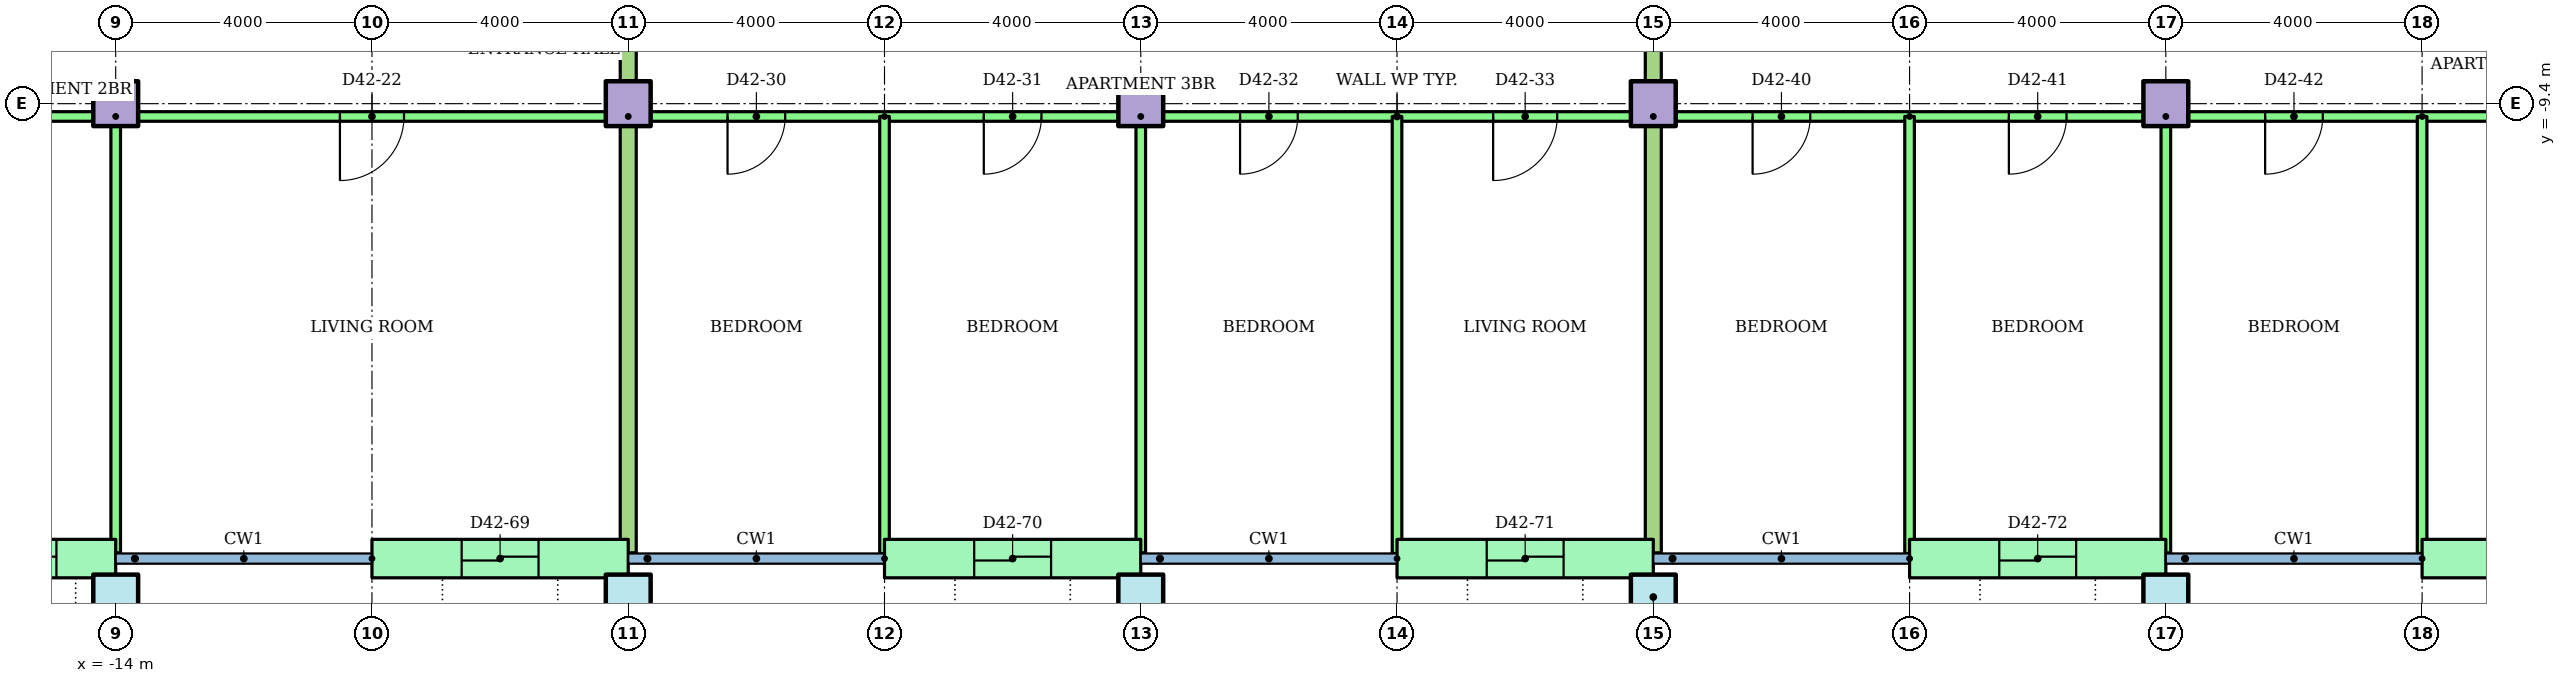
"""IFC4 building model, lengths in metres.
Left out: names, types, materials, properties, quantities, classifications, styles, units other than length and angle.
Written with IfcOpenShell. Run it as: python <this file> out.ifc"""

import sys

from ifc_helpers import new_model, si_unit, direction, frame, frame_2d, origin, origin_2d, place, context, subcontext, project, spatial, rectangle, hollow_rectangle, extrude, element, fill, save


model = new_model("IFC4")
c1 = context("Model", 3, precision=1e-05, world=origin(), true_north=direction((0.0, 1.0)))
c2 = subcontext(c1, "Body", "Model", "MODEL_VIEW")
j1 = project(units=[si_unit("LENGTHUNIT", "METRE"), si_unit("PLANEANGLEUNIT", "RADIAN")], contexts=[c1])
p1 = place(None, origin())
s1 = spatial("IfcSite", under=j1, at=p1, CompositionType="ELEMENT")
p2 = place(p1, origin())
s2 = spatial("IfcBuilding", under=s1, at=p2, CompositionType="ELEMENT")
p3 = place(p2, frame((0.0, 0.0, 165.3)))
s3 = spatial("IfcBuildingStorey", under=s2, at=p3, CompositionType="ELEMENT", Elevation=165.3)
for number, where in (
    (1, (-14.0, -17.1, 0.0)),
    (2, (-6.0, -17.1, 0.0)),
    (3, (2.0, -17.1, 0.0)),
    (4, (10.0, -17.1, 0.0)),
    (5, (18.0, -17.1, 0.0)),
):
    element("IfcColumn", number, at=place(p3, frame(where)), inside=s3, PredefinedType="COLUMN", context=c2, shape_type="SweptSolid", body=[
        extrude(hollow_rectangle(XDim=0.7, YDim=0.7, WallThickness=0.036, at=origin_2d()), origin(), (0.0, 0.0, 1.0), 3.2),
    ])
for number, where in (
    (6, (-14.0, -9.4, 0.0)),
    (7, (-6.0, -9.4, 0.0)),
    (8, (2.0, -9.4, 0.0)),
    (9, (10.0, -9.4, 0.0)),
    (10, (18.0, -9.4, 0.0)),
):
    element("IfcColumn", number, at=place(p3, frame(where)), inside=s3, PredefinedType="COLUMN", context=c2, shape_type="SweptSolid", body=[
        extrude(rectangle(XDim=0.7, YDim=0.7, at=origin_2d()), origin(), (0.0, 0.0, 1.0), 3.2),
    ])
p4 = place(p3, frame((-17.05, -16.5, 0.0)))
e11 = element("IfcWall", 11, at=p4, inside=s3, PredefinedType="STANDARD", context=c2, shape_type="SweptSolid", body=[
    extrude(rectangle(XDim=3.05, YDim=0.6, at=frame_2d((1.525, 0.0))), origin(), (0.0, 0.0, 1.0), 2.92),
])
p5 = place(p4, frame((0.925, 0.0, 0.0)))
e12 = element("IfcOpeningElement", 12, at=p5, cuts=e11, PredefinedType="OPENING", context=c2, shape_type="SweptSolid", body=[
    extrude(rectangle(XDim=1.2, YDim=2.1, at=frame_2d((0.6, 1.05))), frame((0.0, 0.31, 0.0), z_axis=(0.0, -1.0, 0.0), x_axis=(1.0, 0.0, 0.0)), (0.0, 0.0, 1.0), 0.62),
])
p6 = place(p3, frame((-10.0, -16.5, 0.0)))
e13 = element("IfcWall", 13, at=p6, inside=s3, PredefinedType="STANDARD", context=c2, shape_type="SweptSolid", body=[
    extrude(rectangle(XDim=4.0, YDim=0.6, at=frame_2d((2.0, 0.0))), origin(), (0.0, 0.0, 1.0), 2.92),
])
p7 = place(p6, frame((1.4, 0.0, 0.0)))
e14 = element("IfcOpeningElement", 14, at=p7, cuts=e13, PredefinedType="OPENING", context=c2, shape_type="SweptSolid", body=[
    extrude(rectangle(XDim=1.2, YDim=2.1, at=frame_2d((0.6, 1.05))), frame((0.0, 0.31, 0.0), z_axis=(0.0, -1.0, 0.0), x_axis=(1.0, 0.0, 0.0)), (0.0, 0.0, 1.0), 0.62),
])
p8 = place(p3, frame((-2.0, -16.5, 0.0)))
e15 = element("IfcWall", 15, at=p8, inside=s3, PredefinedType="STANDARD", context=c2, shape_type="SweptSolid", body=[
    extrude(rectangle(XDim=4.0, YDim=0.6, at=frame_2d((2.0, 0.0))), origin(), (0.0, 0.0, 1.0), 2.92),
])
p9 = place(p8, frame((1.4, 0.0, 0.0)))
e16 = element("IfcOpeningElement", 16, at=p9, cuts=e15, PredefinedType="OPENING", context=c2, shape_type="SweptSolid", body=[
    extrude(rectangle(XDim=1.2, YDim=2.1, at=frame_2d((0.6, 1.05))), frame((0.0, 0.31, 0.0), z_axis=(0.0, -1.0, 0.0), x_axis=(1.0, 0.0, 0.0)), (0.0, 0.0, 1.0), 0.62),
])
p10 = place(p3, frame((6.0, -16.5, 0.0)))
e17 = element("IfcWall", 17, at=p10, inside=s3, PredefinedType="STANDARD", context=c2, shape_type="SweptSolid", body=[
    extrude(rectangle(XDim=4.0, YDim=0.6, at=frame_2d((2.0, 0.0))), origin(), (0.0, 0.0, 1.0), 2.92),
])
p11 = place(p10, frame((1.4, 0.0, 0.0)))
e18 = element("IfcOpeningElement", 18, at=p11, cuts=e17, PredefinedType="OPENING", context=c2, shape_type="SweptSolid", body=[
    extrude(rectangle(XDim=1.2, YDim=2.1, at=frame_2d((0.6, 1.05))), frame((0.0, 0.31, 0.0), z_axis=(0.0, -1.0, 0.0), x_axis=(1.0, 0.0, 0.0)), (0.0, 0.0, 1.0), 0.62),
])
p12 = place(p3, frame((14.0, -16.5, 0.0)))
e19 = element("IfcWall", 19, at=p12, inside=s3, PredefinedType="STANDARD", context=c2, shape_type="SweptSolid", body=[
    extrude(rectangle(XDim=4.0, YDim=0.6, at=frame_2d((2.0, 0.0))), origin(), (0.0, 0.0, 1.0), 2.92),
])
p13 = place(p12, frame((1.4, 0.0, 0.0)))
e20 = element("IfcOpeningElement", 20, at=p13, cuts=e19, PredefinedType="OPENING", context=c2, shape_type="SweptSolid", body=[
    extrude(rectangle(XDim=1.2, YDim=2.1, at=frame_2d((0.6, 1.05))), frame((0.0, 0.31, 0.0), z_axis=(0.0, -1.0, 0.0), x_axis=(1.0, 0.0, 0.0)), (0.0, 0.0, 1.0), 0.62),
])
p14 = place(p3, frame((22.0, -16.5, 0.0)))
e21 = element("IfcWall", 21, at=p14, inside=s3, PredefinedType="STANDARD", context=c2, shape_type="SweptSolid", body=[
    extrude(rectangle(XDim=4.0, YDim=0.6, at=frame_2d((2.0, 0.0))), origin(), (0.0, 0.0, 1.0), 2.92),
])
p15 = place(p14, frame((1.4, 0.0, 0.0)))
e22 = element("IfcOpeningElement", 22, at=p15, cuts=e21, PredefinedType="OPENING", context=c2, shape_type="SweptSolid", body=[
    extrude(rectangle(XDim=1.2, YDim=2.1, at=frame_2d((0.6, 1.05))), frame((0.0, 0.31, 0.0), z_axis=(0.0, -1.0, 0.0), x_axis=(1.0, 0.0, 0.0)), (0.0, 0.0, 1.0), 0.62),
])
p16 = place(p3, frame((-6.0, -9.6, 0.0), z_axis=(0.0, 0.0, 1.0), x_axis=(-1.0, 0.0, 0.0)))
e23 = element("IfcWall", 23, at=p16, inside=s3, PredefinedType="PARTITIONING", context=c2, shape_type="SweptSolid", body=[
    extrude(rectangle(XDim=18.82, YDim=0.15, at=frame_2d((9.41, 0.0))), origin(), (0.0, 0.0, 1.0), 2.4),
])
p17 = place(p16, frame((16.547, 0.0, 0.0)))
e24 = element("IfcOpeningElement", 24, at=p17, cuts=e23, PredefinedType="OPENING", context=c2, shape_type="SweptSolid", body=[
    extrude(rectangle(XDim=0.9, YDim=2.1, at=frame_2d((0.45, 1.05))), frame((0.0, 0.085, 0.0), z_axis=(0.0, -1.0, 0.0), x_axis=(1.0, 0.0, 0.0)), (0.0, 0.0, 1.0), 0.17),
])
p18 = place(p16, frame((10.45, 0.0, 0.0)))
e25 = element("IfcOpeningElement", 25, at=p18, cuts=e23, PredefinedType="OPENING", context=c2, shape_type="SweptSolid", body=[
    extrude(rectangle(XDim=0.9, YDim=2.1, at=frame_2d((0.45, 1.05))), frame((0.0, 0.085, 0.0), z_axis=(0.0, -1.0, 0.0), x_axis=(1.0, 0.0, 0.0)), (0.0, 0.0, 1.0), 0.17),
])
p19 = place(p16, frame((3.5, 0.0, 0.0)))
e26 = element("IfcOpeningElement", 26, at=p19, cuts=e23, PredefinedType="OPENING", context=c2, shape_type="SweptSolid", body=[
    extrude(rectangle(XDim=1.0, YDim=2.1, at=frame_2d((0.5, 1.05))), frame((0.0, 0.085, 0.0), z_axis=(0.0, -1.0, 0.0), x_axis=(1.0, 0.0, 0.0)), (0.0, 0.0, 1.0), 0.17),
])
p20 = place(p3, frame((-14.0, -9.6, 0.0), z_axis=(0.0, 0.0, 1.0), x_axis=(0.0, -1.0, 0.0)))
e27 = element("IfcWall", 27, at=p20, inside=s3, PredefinedType="PARTITIONING", context=c2, shape_type="SweptSolid", body=[
    extrude(rectangle(XDim=6.81, YDim=0.15, at=frame_2d((3.405, 0.0))), origin(), (0.0, 0.0, 1.0), 2.4),
])
p21 = place(p3, frame((10.0, -9.6, 0.0), z_axis=(0.0, 0.0, 1.0), x_axis=(-1.0, 0.0, 0.0)))
e28 = element("IfcWall", 28, at=p21, inside=s3, PredefinedType="PARTITIONING", context=c2, shape_type="SweptSolid", body=[
    extrude(rectangle(XDim=16.0, YDim=0.15, at=frame_2d((8.0, 0.0))), origin(), (0.0, 0.0, 1.0), 2.4),
])
p22 = place(p21, frame((13.55, 0.0, 0.0)))
e29 = element("IfcOpeningElement", 29, at=p22, cuts=e28, PredefinedType="OPENING", context=c2, shape_type="SweptSolid", body=[
    extrude(rectangle(XDim=0.9, YDim=2.1, at=frame_2d((0.45, 1.05))), frame((0.0, 0.085, 0.0), z_axis=(0.0, -1.0, 0.0), x_axis=(1.0, 0.0, 0.0)), (0.0, 0.0, 1.0), 0.17),
])
p23 = place(p21, frame((9.55, 0.0, 0.0)))
e30 = element("IfcOpeningElement", 30, at=p23, cuts=e28, PredefinedType="OPENING", context=c2, shape_type="SweptSolid", body=[
    extrude(rectangle(XDim=0.9, YDim=2.1, at=frame_2d((0.45, 1.05))), frame((0.0, 0.085, 0.0), z_axis=(0.0, -1.0, 0.0), x_axis=(1.0, 0.0, 0.0)), (0.0, 0.0, 1.0), 0.17),
])
p24 = place(p21, frame((5.55, 0.0, 0.0)))
e31 = element("IfcOpeningElement", 31, at=p24, cuts=e28, PredefinedType="OPENING", context=c2, shape_type="SweptSolid", body=[
    extrude(rectangle(XDim=0.9, YDim=2.1, at=frame_2d((0.45, 1.05))), frame((0.0, 0.085, 0.0), z_axis=(0.0, -1.0, 0.0), x_axis=(1.0, 0.0, 0.0)), (0.0, 0.0, 1.0), 0.17),
])
p25 = place(p21, frame((1.5, 0.0, 0.0)))
e32 = element("IfcOpeningElement", 32, at=p25, cuts=e28, PredefinedType="OPENING", context=c2, shape_type="SweptSolid", body=[
    extrude(rectangle(XDim=1.0, YDim=2.1, at=frame_2d((0.5, 1.05))), frame((0.0, 0.085, 0.0), z_axis=(0.0, -1.0, 0.0), x_axis=(1.0, 0.0, 0.0)), (0.0, 0.0, 1.0), 0.17),
])
p26 = place(p3, frame((-2.0, -9.6, 0.0), z_axis=(0.0, 0.0, 1.0), x_axis=(0.0, -1.0, 0.0)))
e33 = element("IfcWall", 33, at=p26, inside=s3, PredefinedType="PARTITIONING", context=c2, shape_type="SweptSolid", body=[
    extrude(rectangle(XDim=6.821, YDim=0.15, at=frame_2d((3.41, 0.0))), origin(), (0.0, 0.0, 1.0), 2.4),
])
p27 = place(p3, frame((2.0, -9.6, 0.0), z_axis=(0.0, 0.0, 1.0), x_axis=(0.0, -1.0, 0.0)))
e34 = element("IfcWall", 34, at=p27, inside=s3, PredefinedType="PARTITIONING", context=c2, shape_type="SweptSolid", body=[
    extrude(rectangle(XDim=6.81, YDim=0.15, at=frame_2d((3.405, 0.0))), origin(), (0.0, 0.0, 1.0), 2.4),
])
p28 = place(p3, frame((6.0, -9.6, 0.0), z_axis=(0.0, 0.0, 1.0), x_axis=(0.0, -1.0, 0.0)))
e35 = element("IfcWall", 35, at=p28, inside=s3, PredefinedType="PARTITIONING", context=c2, shape_type="SweptSolid", body=[
    extrude(rectangle(XDim=6.821, YDim=0.15, at=frame_2d((3.41, 0.0))), origin(), (0.0, 0.0, 1.0), 2.4),
])
p29 = place(p3, frame((-6.0, -1.4, 0.0), z_axis=(0.0, 0.0, 1.0), x_axis=(0.0, -1.0, 0.0)))
e36 = element("IfcWall", 36, at=p29, inside=s3, PredefinedType="PARTITIONING", context=c2, shape_type="SweptSolid", body=[
    extrude(rectangle(XDim=15.01, YDim=0.25, at=frame_2d((7.505, 0.0))), origin(), (0.0, 0.0, 1.0), 2.4),
])
p30 = place(p3, frame((36.82, -9.6, 0.0), z_axis=(0.0, 0.0, 1.0), x_axis=(-1.0, 0.0, 0.0)))
e37 = element("IfcWall", 37, at=p30, inside=s3, PredefinedType="PARTITIONING", context=c2, shape_type="SweptSolid", body=[
    extrude(rectangle(XDim=26.82, YDim=0.15, at=frame_2d((13.41, 0.0))), origin(), (0.0, 0.0, 1.0), 2.4),
])
p31 = place(p30, frame((24.37, 0.0, 0.0)))
e38 = element("IfcOpeningElement", 38, at=p31, cuts=e37, PredefinedType="OPENING", context=c2, shape_type="SweptSolid", body=[
    extrude(rectangle(XDim=0.9, YDim=2.1, at=frame_2d((0.45, 1.05))), frame((0.0, 0.085, 0.0), z_axis=(0.0, -1.0, 0.0), x_axis=(1.0, 0.0, 0.0)), (0.0, 0.0, 1.0), 0.17),
])
p32 = place(p30, frame((20.37, 0.0, 0.0)))
e39 = element("IfcOpeningElement", 39, at=p32, cuts=e37, PredefinedType="OPENING", context=c2, shape_type="SweptSolid", body=[
    extrude(rectangle(XDim=0.9, YDim=2.1, at=frame_2d((0.45, 1.05))), frame((0.0, 0.085, 0.0), z_axis=(0.0, -1.0, 0.0), x_axis=(1.0, 0.0, 0.0)), (0.0, 0.0, 1.0), 0.17),
])
p33 = place(p30, frame((16.37, 0.0, 0.0)))
e40 = element("IfcOpeningElement", 40, at=p33, cuts=e37, PredefinedType="OPENING", context=c2, shape_type="SweptSolid", body=[
    extrude(rectangle(XDim=0.9, YDim=2.1, at=frame_2d((0.45, 1.05))), frame((0.0, 0.085, 0.0), z_axis=(0.0, -1.0, 0.0), x_axis=(1.0, 0.0, 0.0)), (0.0, 0.0, 1.0), 0.17),
])
p34 = place(p30, frame((9.27, 0.0, 0.0)))
e41 = element("IfcOpeningElement", 41, at=p34, cuts=e37, PredefinedType="OPENING", context=c2, shape_type="SweptSolid", body=[
    extrude(rectangle(XDim=1.0, YDim=2.1, at=frame_2d((0.5, 1.05))), frame((0.0, 0.085, 0.0), z_axis=(0.0, -1.0, 0.0), x_axis=(1.0, 0.0, 0.0)), (0.0, 0.0, 1.0), 0.17),
])
p35 = place(p30, frame((1.373, 0.0, 0.0)))
e42 = element("IfcOpeningElement", 42, at=p35, cuts=e37, PredefinedType="OPENING", context=c2, shape_type="SweptSolid", body=[
    extrude(rectangle(XDim=0.9, YDim=2.1, at=frame_2d((0.45, 1.05))), frame((0.0, 0.085, 0.0), z_axis=(0.0, -1.0, 0.0), x_axis=(1.0, 0.0, 0.0)), (0.0, 0.0, 1.0), 0.17),
])
p36 = place(p3, frame((14.0, -9.6, 0.0), z_axis=(0.0, 0.0, 1.0), x_axis=(0.0, -1.0, 0.0)))
e43 = element("IfcWall", 43, at=p36, inside=s3, PredefinedType="PARTITIONING", context=c2, shape_type="SweptSolid", body=[
    extrude(rectangle(XDim=6.821, YDim=0.15, at=frame_2d((3.41, 0.0))), origin(), (0.0, 0.0, 1.0), 2.4),
])
p37 = place(p3, frame((18.0, -9.6, 0.0), z_axis=(0.0, 0.0, 1.0), x_axis=(0.0, -1.0, 0.0)))
e44 = element("IfcWall", 44, at=p37, inside=s3, PredefinedType="PARTITIONING", context=c2, shape_type="SweptSolid", body=[
    extrude(rectangle(XDim=6.81, YDim=0.15, at=frame_2d((3.405, 0.0))), origin(), (0.0, 0.0, 1.0), 2.4),
])
p38 = place(p3, frame((22.0, -9.6, 0.0), z_axis=(0.0, 0.0, 1.0), x_axis=(0.0, -1.0, 0.0)))
e45 = element("IfcWall", 45, at=p38, inside=s3, PredefinedType="PARTITIONING", context=c2, shape_type="SweptSolid", body=[
    extrude(rectangle(XDim=6.821, YDim=0.15, at=frame_2d((3.41, 0.0))), origin(), (0.0, 0.0, 1.0), 2.4),
])
p39 = place(p3, frame((10.0, -1.4, 0.0), z_axis=(0.0, 0.0, 1.0), x_axis=(0.0, -1.0, 0.0)))
e46 = element("IfcWall", 46, at=p39, inside=s3, PredefinedType="PARTITIONING", context=c2, shape_type="SweptSolid", body=[
    extrude(rectangle(XDim=15.01, YDim=0.25, at=frame_2d((7.505, 0.0))), origin(), (0.0, 0.0, 1.0), 2.4),
])
p40 = place(p19, origin())
e47 = element("IfcDoor", 47, at=p40, inside=s3, OperationType="SINGLE_SWING_RIGHT", PredefinedType="DOOR", context=c2, shape_type="SweptSolid", body=[
    extrude(rectangle(XDim=1.0, YDim=2.1, at=frame_2d((0.5, 1.05))), frame((0.0, 0.025, 0.0), z_axis=(0.0, -1.0, 0.0), x_axis=(1.0, 0.0, 0.0)), (0.0, 0.0, 1.0), 0.05),
])
fill(e26, e47)
p41 = place(p22, origin())
e48 = element("IfcDoor", 48, at=p41, inside=s3, OperationType="SINGLE_SWING_RIGHT", PredefinedType="DOOR", context=c2, shape_type="SweptSolid", body=[
    extrude(rectangle(XDim=0.9, YDim=2.1, at=frame_2d((0.45, 1.05))), frame((0.0, 0.025, 0.0), z_axis=(0.0, -1.0, 0.0), x_axis=(1.0, 0.0, 0.0)), (0.0, 0.0, 1.0), 0.05),
])
fill(e29, e48)
p42 = place(p23, origin())
e49 = element("IfcDoor", 49, at=p42, inside=s3, OperationType="SINGLE_SWING_RIGHT", PredefinedType="DOOR", context=c2, shape_type="SweptSolid", body=[
    extrude(rectangle(XDim=0.9, YDim=2.1, at=frame_2d((0.45, 1.05))), frame((0.0, 0.025, 0.0), z_axis=(0.0, -1.0, 0.0), x_axis=(1.0, 0.0, 0.0)), (0.0, 0.0, 1.0), 0.05),
])
fill(e30, e49)
p43 = place(p24, origin())
e50 = element("IfcDoor", 50, at=p43, inside=s3, OperationType="SINGLE_SWING_RIGHT", PredefinedType="DOOR", context=c2, shape_type="SweptSolid", body=[
    extrude(rectangle(XDim=0.9, YDim=2.1, at=frame_2d((0.45, 1.05))), frame((0.0, 0.025, 0.0), z_axis=(0.0, -1.0, 0.0), x_axis=(1.0, 0.0, 0.0)), (0.0, 0.0, 1.0), 0.05),
])
fill(e31, e50)
p44 = place(p25, origin())
e51 = element("IfcDoor", 51, at=p44, inside=s3, OperationType="SINGLE_SWING_RIGHT", PredefinedType="DOOR", context=c2, shape_type="SweptSolid", body=[
    extrude(rectangle(XDim=1.0, YDim=2.1, at=frame_2d((0.5, 1.05))), frame((0.0, 0.025, 0.0), z_axis=(0.0, -1.0, 0.0), x_axis=(1.0, 0.0, 0.0)), (0.0, 0.0, 1.0), 0.05),
])
fill(e32, e51)
p45 = place(p31, origin())
e52 = element("IfcDoor", 52, at=p45, inside=s3, OperationType="SINGLE_SWING_RIGHT", PredefinedType="DOOR", context=c2, shape_type="SweptSolid", body=[
    extrude(rectangle(XDim=0.9, YDim=2.1, at=frame_2d((0.45, 1.05))), frame((0.0, 0.025, 0.0), z_axis=(0.0, -1.0, 0.0), x_axis=(1.0, 0.0, 0.0)), (0.0, 0.0, 1.0), 0.05),
])
fill(e38, e52)
p46 = place(p32, origin())
e53 = element("IfcDoor", 53, at=p46, inside=s3, OperationType="SINGLE_SWING_RIGHT", PredefinedType="DOOR", context=c2, shape_type="SweptSolid", body=[
    extrude(rectangle(XDim=0.9, YDim=2.1, at=frame_2d((0.45, 1.05))), frame((0.0, 0.025, 0.0), z_axis=(0.0, -1.0, 0.0), x_axis=(1.0, 0.0, 0.0)), (0.0, 0.0, 1.0), 0.05),
])
fill(e39, e53)
p47 = place(p33, origin())
e54 = element("IfcDoor", 54, at=p47, inside=s3, OperationType="SINGLE_SWING_RIGHT", PredefinedType="DOOR", context=c2, shape_type="SweptSolid", body=[
    extrude(rectangle(XDim=0.9, YDim=2.1, at=frame_2d((0.45, 1.05))), frame((0.0, 0.025, 0.0), z_axis=(0.0, -1.0, 0.0), x_axis=(1.0, 0.0, 0.0)), (0.0, 0.0, 1.0), 0.05),
])
fill(e40, e54)
p48 = place(p5, origin())
e55 = element("IfcDoor", 55, at=p48, inside=s3, OperationType="SLIDING_TO_LEFT", PredefinedType="DOOR", context=c2, shape_type="SweptSolid", body=[
    extrude(rectangle(XDim=1.2, YDim=2.1, at=frame_2d((0.6, 1.05))), frame((0.0, 0.025, 0.0), z_axis=(0.0, -1.0, 0.0), x_axis=(1.0, 0.0, 0.0)), (0.0, 0.0, 1.0), 0.05),
])
fill(e12, e55)
p49 = place(p7, origin())
e56 = element("IfcDoor", 56, at=p49, inside=s3, OperationType="SLIDING_TO_LEFT", PredefinedType="DOOR", context=c2, shape_type="SweptSolid", body=[
    extrude(rectangle(XDim=1.2, YDim=2.1, at=frame_2d((0.6, 1.05))), frame((0.0, 0.025, 0.0), z_axis=(0.0, -1.0, 0.0), x_axis=(1.0, 0.0, 0.0)), (0.0, 0.0, 1.0), 0.05),
])
fill(e14, e56)
p50 = place(p9, origin())
e57 = element("IfcDoor", 57, at=p50, inside=s3, OperationType="SLIDING_TO_LEFT", PredefinedType="DOOR", context=c2, shape_type="SweptSolid", body=[
    extrude(rectangle(XDim=1.2, YDim=2.1, at=frame_2d((0.6, 1.05))), frame((0.0, 0.025, 0.0), z_axis=(0.0, -1.0, 0.0), x_axis=(1.0, 0.0, 0.0)), (0.0, 0.0, 1.0), 0.05),
])
fill(e16, e57)
p51 = place(p11, origin())
e58 = element("IfcDoor", 58, at=p51, inside=s3, OperationType="SLIDING_TO_LEFT", PredefinedType="DOOR", context=c2, shape_type="SweptSolid", body=[
    extrude(rectangle(XDim=1.2, YDim=2.1, at=frame_2d((0.6, 1.05))), frame((0.0, 0.025, 0.0), z_axis=(0.0, -1.0, 0.0), x_axis=(1.0, 0.0, 0.0)), (0.0, 0.0, 1.0), 0.05),
])
fill(e18, e58)
p52 = place(p13, origin())
e59 = element("IfcDoor", 59, at=p52, inside=s3, OperationType="SLIDING_TO_LEFT", PredefinedType="DOOR", context=c2, shape_type="SweptSolid", body=[
    extrude(rectangle(XDim=1.2, YDim=2.1, at=frame_2d((0.6, 1.05))), frame((0.0, 0.025, 0.0), z_axis=(0.0, -1.0, 0.0), x_axis=(1.0, 0.0, 0.0)), (0.0, 0.0, 1.0), 0.05),
])
fill(e20, e59)
save(model, sys.argv[1])
